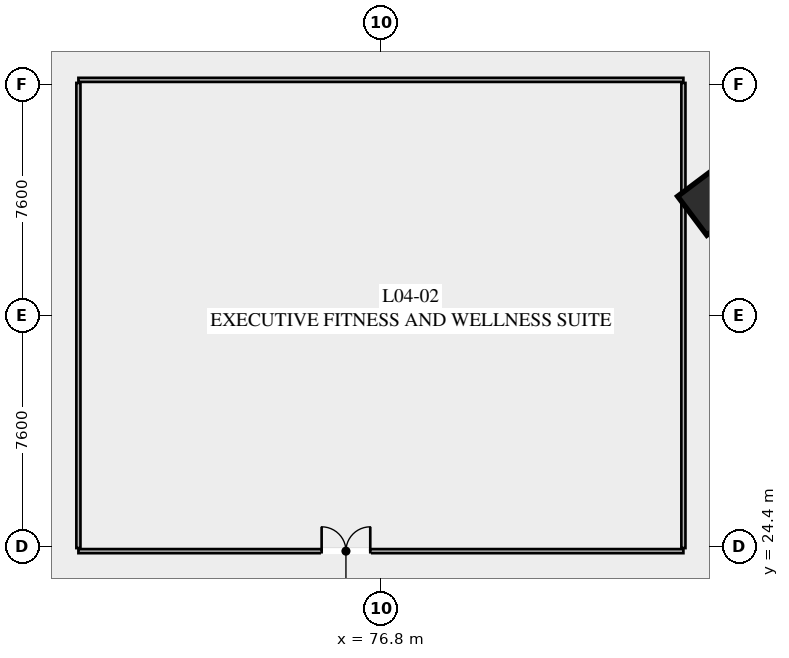
"""IFC4 building model, lengths in metres.
Left out: names, types, materials, properties, quantities, classifications, styles, units other than length and angle.
Written with IfcOpenShell. Run it as: python <this file> out.ifc"""

import sys

from ifc_helpers import new_model, si_unit, direction, frame, frame_2d, origin, origin_2d, place, context, subcontext, project, spatial, rectangle, hollow_rectangle, extrude, element, fill, save


model = new_model("IFC4")
c1 = context("Model", 3, precision=1e-05, world=origin(), true_north=direction((0.0, 1.0)))
c2 = subcontext(c1, "Body", "Model", "MODEL_VIEW")
j1 = project(units=[si_unit("LENGTHUNIT", "METRE"), si_unit("PLANEANGLEUNIT", "RADIAN")], contexts=[c1])
p1 = place(None, origin())
s1 = spatial("IfcSite", under=j1, at=p1, CompositionType="ELEMENT")
p2 = place(p1, origin())
s2 = spatial("IfcBuilding", under=s1, at=p2, CompositionType="ELEMENT")
p3 = place(p2, frame((0.0, 0.0, 19.8)))
s3 = spatial("IfcBuildingStorey", under=s2, at=p3, CompositionType="ELEMENT", Elevation=19.8)
p4 = place(p3, frame((87.68, 35.76, 0.0), z_axis=(0.0, 0.0, 1.0), x_axis=(0.799999996291, 0.600000004945, 0.0)))
e1 = element("IfcColumn", 1, at=p4, inside=s3, PredefinedType="COLUMN", context=c2, shape_type="SweptSolid", body=[
    extrude(hollow_rectangle(XDim=1.6, YDim=1.6, WallThickness=0.06, at=origin_2d()), origin(), (0.0, 0.0, 1.0), 4.6),
])
p5 = place(p3, frame((66.85, 24.25, 0.0), z_axis=(0.0, 0.0, 1.0), x_axis=(1.0, 0.0, 0.0)))
e2 = element("IfcWall", 2, at=p5, inside=s3, PredefinedType="PARTITIONING", context=c2, shape_type="SweptSolid", body=[
    extrude(rectangle(XDim=19.9, YDim=0.135, at=frame_2d((9.95, 0.0))), origin(), (0.0, 0.0, 1.0), 3.643),
])
p6 = place(p5, frame((8.0, 0.0, 0.0)))
e3 = element("IfcOpeningElement", 3, at=p6, cuts=e2, PredefinedType="OPENING", context=c2, shape_type="SweptSolid", body=[
    extrude(rectangle(XDim=1.6, YDim=2.25, at=frame_2d((0.8, 1.125))), frame((0.0, 0.077, 0.0), z_axis=(0.0, -1.0, 0.0), x_axis=(1.0, 0.0, 0.0)), (0.0, 0.0, 1.0), 0.155),
])
for number, where, z_axis, x_axis in (
    (4, (66.85, 24.35, 0.0), (0.0, 0.0, 1.0), (0.0, 1.0, 0.0)),
    (5, (86.75, 24.35, 0.0), (0.0, 0.0, 1.0), (0.0, 1.0, 0.0)),
):
    element("IfcWall", number, at=place(p3, frame(where, z_axis=z_axis, x_axis=x_axis)), inside=s3, PredefinedType="PARTITIONING", context=c2, shape_type="SweptSolid", body=[
        extrude(rectangle(XDim=15.3, YDim=0.135, at=frame_2d((7.65, 0.0))), origin(), (0.0, 0.0, 1.0), 3.643),
    ])
p7 = place(p3, frame((66.85, 39.75, 0.0), z_axis=(0.0, 0.0, 1.0), x_axis=(1.0, 0.0, 0.0)))
e6 = element("IfcWall", 6, at=p7, inside=s3, PredefinedType="PARTITIONING", context=c2, shape_type="SweptSolid", body=[
    extrude(rectangle(XDim=19.9, YDim=0.135, at=frame_2d((9.95, 0.0))), origin(), (0.0, 0.0, 1.0), 3.643),
])
p8 = place(p6, origin())
e7 = element("IfcDoor", 7, at=p8, inside=s3, OperationType="DOUBLE_DOOR_SINGLE_SWING", PredefinedType="DOOR", context=c2, shape_type="SweptSolid", body=[
    extrude(rectangle(XDim=1.6, YDim=2.25, at=frame_2d((0.8, 1.125))), frame((0.0, 0.025, 0.0), z_axis=(0.0, -1.0, 0.0), x_axis=(1.0, 0.0, 0.0)), (0.0, 0.0, 1.0), 0.05),
])
fill(e3, e7)
save(model, sys.argv[1])
